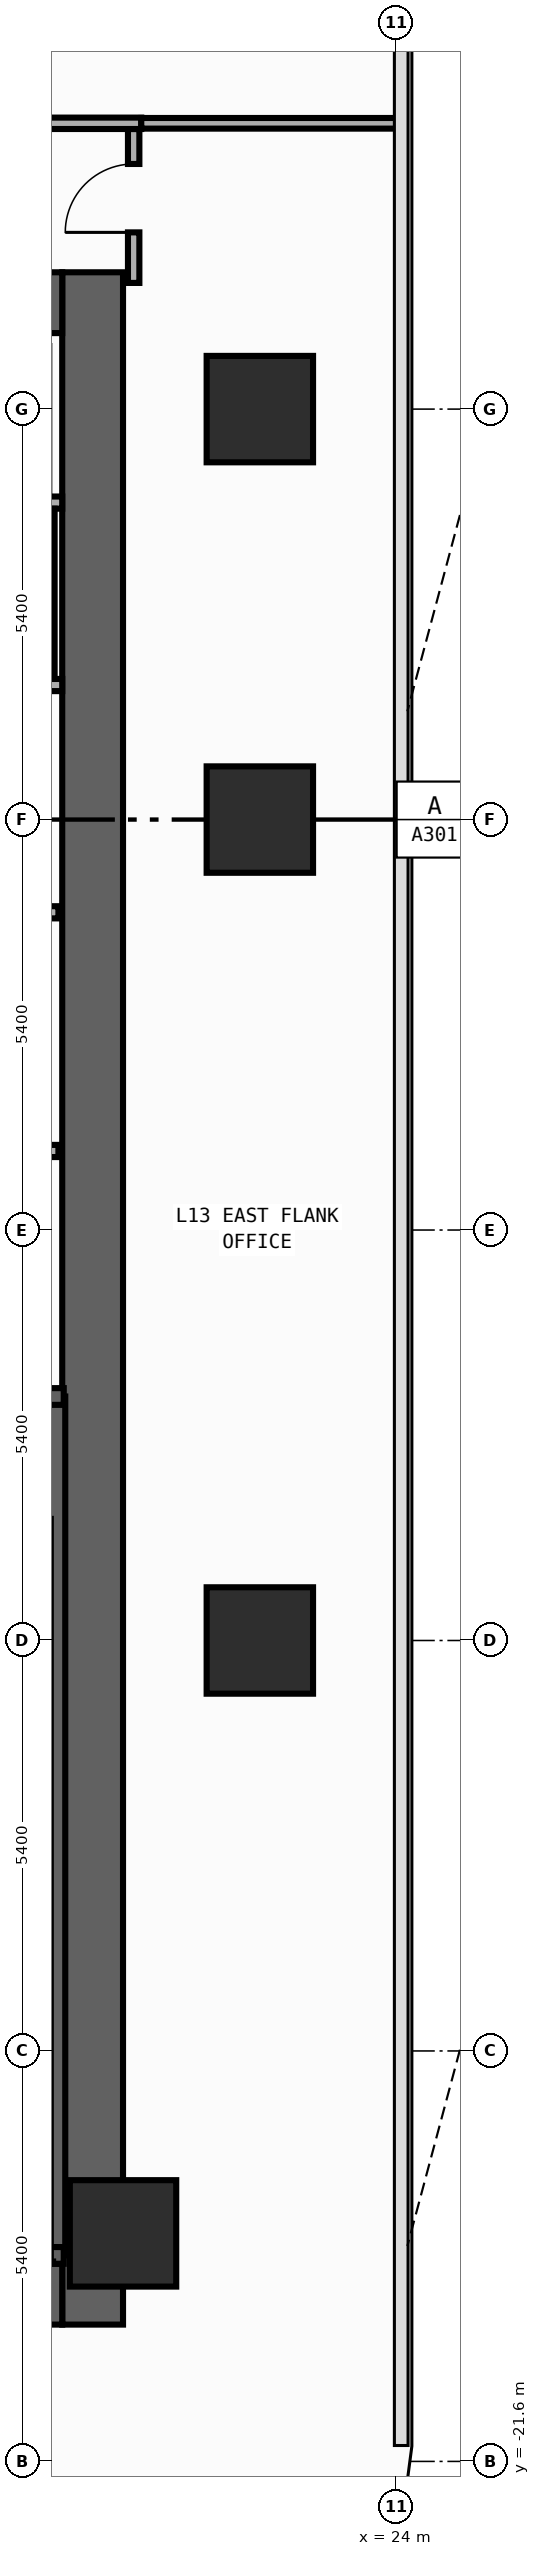
"""IFC4 building model, lengths in metres.
Left out: names, types, materials, properties, quantities, classifications, styles, units other than length and angle.
Written with IfcOpenShell. Run it as: python <this file> out.ifc"""

import sys

from ifc_helpers import new_model, si_unit, direction, frame, frame_2d, origin, origin_2d, place, context, subcontext, project, spatial, rectangle, extrude, element, fill, save


model = new_model("IFC4")
c1 = context("Model", 3, precision=1e-05, world=origin(), true_north=direction((0.0, 1.0)))
c2 = subcontext(c1, "Body", "Model", "MODEL_VIEW")
j1 = project(units=[si_unit("LENGTHUNIT", "METRE"), si_unit("PLANEANGLEUNIT", "RADIAN")], contexts=[c1])
p1 = place(None, origin())
s1 = spatial("IfcSite", under=j1, at=p1, CompositionType="ELEMENT")
p2 = place(p1, origin())
s2 = spatial("IfcBuilding", under=s1, at=p2, CompositionType="ELEMENT")
p3 = place(p2, frame((0.0, 0.0, 55.4)))
s3 = spatial("IfcBuildingStorey", under=s2, at=p3, CompositionType="ELEMENT", Elevation=55.4)
p4 = place(p3, frame((20.0, -19.8, 0.0), z_axis=(0.0, 0.0, 1.0), x_axis=(0.0, 1.0, 0.0)))
e1 = element("IfcWall", 1, at=p4, inside=s3, PredefinedType="SHEAR", context=c2, shape_type="SweptSolid", body=[
    extrude(rectangle(XDim=27.0, YDim=0.8, at=frame_2d((13.5, 0.0))), origin(), (0.0, 0.0, 1.0), 3.94),
])
for number, where, z_axis, x_axis in (
    (2, (12.8, -19.4, 0.0), (0.0, 0.0, 1.0), (1.0, 0.0, 0.0)),
    (3, (12.8, 6.8, 0.0), (0.0, 0.0, 1.0), (1.0, 0.0, 0.0)),
):
    element("IfcWall", number, at=place(p3, frame(where, z_axis=z_axis, x_axis=x_axis)), inside=s3, PredefinedType="SHEAR", context=c2, shape_type="SweptSolid", body=[
        extrude(rectangle(XDim=6.8, YDim=0.8, at=frame_2d((3.4, 0.0))), origin(), (0.0, 0.0, 1.0), 3.94),
    ])
p5 = place(p3, frame((19.53, -18.89, 0.0), z_axis=(0.0, 0.0, 1.0), x_axis=(0.0, 1.0, 0.0)))
e4 = element("IfcWall", 4, at=p5, inside=s3, PredefinedType="SHEAR", context=c2, shape_type="SweptSolid", body=[
    extrude(rectangle(XDim=11.3, YDim=0.22, at=frame_2d((5.65, 0.0))), origin(), (0.0, 0.0, 1.0), 3.94),
])
p6 = place(p3, frame((15.705, -18.89, 0.0), z_axis=(0.0, 0.0, 1.0), x_axis=(1.0, 0.0, 0.0)))
e5 = element("IfcWall", 5, at=p6, inside=s3, PredefinedType="SHEAR", context=c2, shape_type="SweptSolid", body=[
    extrude(rectangle(XDim=3.915, YDim=0.22, at=frame_2d((1.958, 0.0))), origin(), (0.0, 0.0, 1.0), 3.94),
])
p7 = place(p3, frame((19.62, -7.59, 0.0), z_axis=(0.0, 0.0, 1.0), x_axis=(-1.0, 0.0, 0.0)))
e6 = element("IfcWall", 6, at=p7, inside=s3, PredefinedType="SHEAR", context=c2, shape_type="SweptSolid", body=[
    extrude(rectangle(XDim=3.915, YDim=0.22, at=frame_2d((1.958, 0.0))), origin(), (0.0, 0.0, 1.0), 3.94),
])
p8 = place(p7, frame((1.08, 0.0, 0.0)))
e7 = element("IfcOpeningElement", 7, at=p8, cuts=e6, PredefinedType="OPENING", context=c2, shape_type="SweptSolid", body=[
    extrude(rectangle(XDim=1.1, YDim=2.2, at=frame_2d((0.55, 1.1))), frame((0.0, 0.12, 0.0), z_axis=(0.0, -1.0, 0.0), x_axis=(1.0, 0.0, 0.0)), (0.0, 0.0, 1.0), 0.24),
])
for number, where, z_axis, x_axis in (
    (8, (20.4, -18.6, 0.0), (0.0, 0.0, 1.0), (1.0, 0.0, 0.0)),
    (9, (22.2, -10.8, 0.0), (0.0, 0.0, 1.0), (1.0, 0.0, 0.0)),
    (10, (22.2, 0.0, 0.0), (0.0, 0.0, 1.0), (1.0, 0.0, 0.0)),
    (11, (22.2, 5.4, 0.0), (0.0, 0.0, 1.0), (1.0, 0.0, 0.0)),
):
    element("IfcColumn", number, at=place(p3, frame(where, z_axis=z_axis, x_axis=x_axis)), inside=s3, PredefinedType="COLUMN", context=c2, shape_type="SweptSolid", body=[
        extrude(rectangle(XDim=1.4, YDim=1.4, at=origin_2d()), origin(), (0.0, 0.0, 1.0), 4.2),
    ])
p9 = place(p3, frame((15.75, -4.36, 0.0), z_axis=(0.0, 0.0, 1.0), x_axis=(1.0, 0.0, 0.0)))
e12 = element("IfcWall", 12, at=p9, inside=s3, PredefinedType="STANDARD", context=c2, shape_type="SweptSolid", body=[
    extrude(rectangle(XDim=3.8, YDim=0.16, at=frame_2d((1.9, 0.0))), origin(), (0.0, 0.0, 1.0), 3.94),
])
p10 = place(p9, frame((1.47, 0.0, 0.0)))
e13 = element("IfcOpeningElement", 13, at=p10, cuts=e12, PredefinedType="OPENING", context=c2, shape_type="SweptSolid", body=[
    extrude(rectangle(XDim=1.15, YDim=2.2, at=frame_2d((0.575, 1.1))), frame((0.0, 0.09, 0.0), z_axis=(0.0, -1.0, 0.0), x_axis=(1.0, 0.0, 0.0)), (0.0, 0.0, 1.0), 0.18),
])
p11 = place(p3, frame((15.75, -1.22, 0.0), z_axis=(0.0, 0.0, 1.0), x_axis=(1.0, 0.0, 0.0)))
e14 = element("IfcWall", 14, at=p11, inside=s3, PredefinedType="STANDARD", context=c2, shape_type="SweptSolid", body=[
    extrude(rectangle(XDim=3.8, YDim=0.16, at=frame_2d((1.9, 0.0))), origin(), (0.0, 0.0, 1.0), 3.94),
])
for number, where, z_axis, x_axis in (
    (15, (17.31, 4.17, 0.0), (0.0, 0.0, 1.0), (1.0, 0.0, 0.0)),
    (16, (17.31, 1.77, 0.0), (0.0, 0.0, 1.0), (1.0, 0.0, 0.0)),
):
    element("IfcWall", number, at=place(p3, frame(where, z_axis=z_axis, x_axis=x_axis)), inside=s3, PredefinedType="PARTITIONING", context=c2, shape_type="SweptSolid", body=[
        extrude(rectangle(XDim=2.29, YDim=0.16, at=frame_2d((1.145, 0.0))), origin(), (0.0, 0.0, 1.0), 3.94),
    ])
p12 = place(p3, frame((20.54, 7.06, 0.0), z_axis=(0.0, 0.0, 1.0), x_axis=(0.0, 1.0, 0.0)))
e17 = element("IfcWall", 17, at=p12, inside=s3, PredefinedType="PARTITIONING", context=c2, shape_type="SweptSolid", body=[
    extrude(rectangle(XDim=2.025, YDim=0.15, at=frame_2d((1.012, 0.0))), origin(), (0.0, 0.0, 1.0), 3.94),
])
p13 = place(p12, frame((0.665, 0.0, 0.0)))
e18 = element("IfcOpeningElement", 18, at=p13, cuts=e17, PredefinedType="OPENING", context=c2, shape_type="SweptSolid", body=[
    extrude(rectangle(XDim=0.9, YDim=2.15, at=frame_2d((0.45, 1.075))), frame((0.0, 0.085, 0.0), z_axis=(0.0, -1.0, 0.0), x_axis=(1.0, 0.0, 0.0)), (0.0, 0.0, 1.0), 0.17),
])
p14 = place(p3, frame((11.81, 9.16, 0.0), z_axis=(0.0, 0.0, 1.0), x_axis=(1.0, 0.0, 0.0)))
e19 = element("IfcWall", 19, at=p14, inside=s3, PredefinedType="PARTITIONING", context=c2, shape_type="SweptSolid", body=[
    extrude(rectangle(XDim=8.83, YDim=0.15, at=frame_2d((4.415, 0.0))), origin(), (0.0, 0.0, 1.0), 3.94),
])
p15 = place(p14, frame((5.067, 0.0, 0.0)))
e20 = element("IfcOpeningElement", 20, at=p15, cuts=e19, PredefinedType="OPENING", context=c2, shape_type="SweptSolid", body=[
    extrude(rectangle(XDim=0.9, YDim=2.15, at=frame_2d((0.45, 1.075))), frame((0.0, 0.085, 0.0), z_axis=(0.0, -1.0, 0.0), x_axis=(1.0, 0.0, 0.0)), (0.0, 0.0, 1.0), 0.17),
])
p16 = place(p3, frame((20.64, 9.16, 0.0), z_axis=(0.0, 0.0, 1.0), x_axis=(1.0, 0.0, 0.0)))
e21 = element("IfcWall", 21, at=p16, inside=s3, PredefinedType="PARTITIONING", context=c2, shape_type="SweptSolid", body=[
    extrude(rectangle(XDim=3.415, YDim=0.14, at=frame_2d((1.708, 0.0))), origin(), (0.0, 0.0, 1.0), 3.94),
])
p17 = place(p3, frame((19.45, 4.09, 0.0), z_axis=(0.0, 0.0, 1.0), x_axis=(0.0, -1.0, 0.0)))
e22 = element("IfcWall", 22, at=p17, inside=s3, PredefinedType="PARTITIONING", context=c2, shape_type="SweptSolid", body=[
    extrude(rectangle(XDim=2.24, YDim=0.1, at=frame_2d((1.12, 0.0))), origin(), (0.0, 0.0, 1.0), 3.94),
])
p18 = place(p13, origin())
e23 = element("IfcDoor", 23, at=p18, inside=s3, OperationType="SINGLE_SWING_LEFT", PredefinedType="DOOR", context=c2, shape_type="SweptSolid", body=[
    extrude(rectangle(XDim=0.9, YDim=2.15, at=frame_2d((0.45, 1.075))), frame((0.0, 0.025, 0.0), z_axis=(0.0, -1.0, 0.0), x_axis=(1.0, 0.0, 0.0)), (0.0, 0.0, 1.0), 0.05),
])
fill(e18, e23)
save(model, sys.argv[1])
